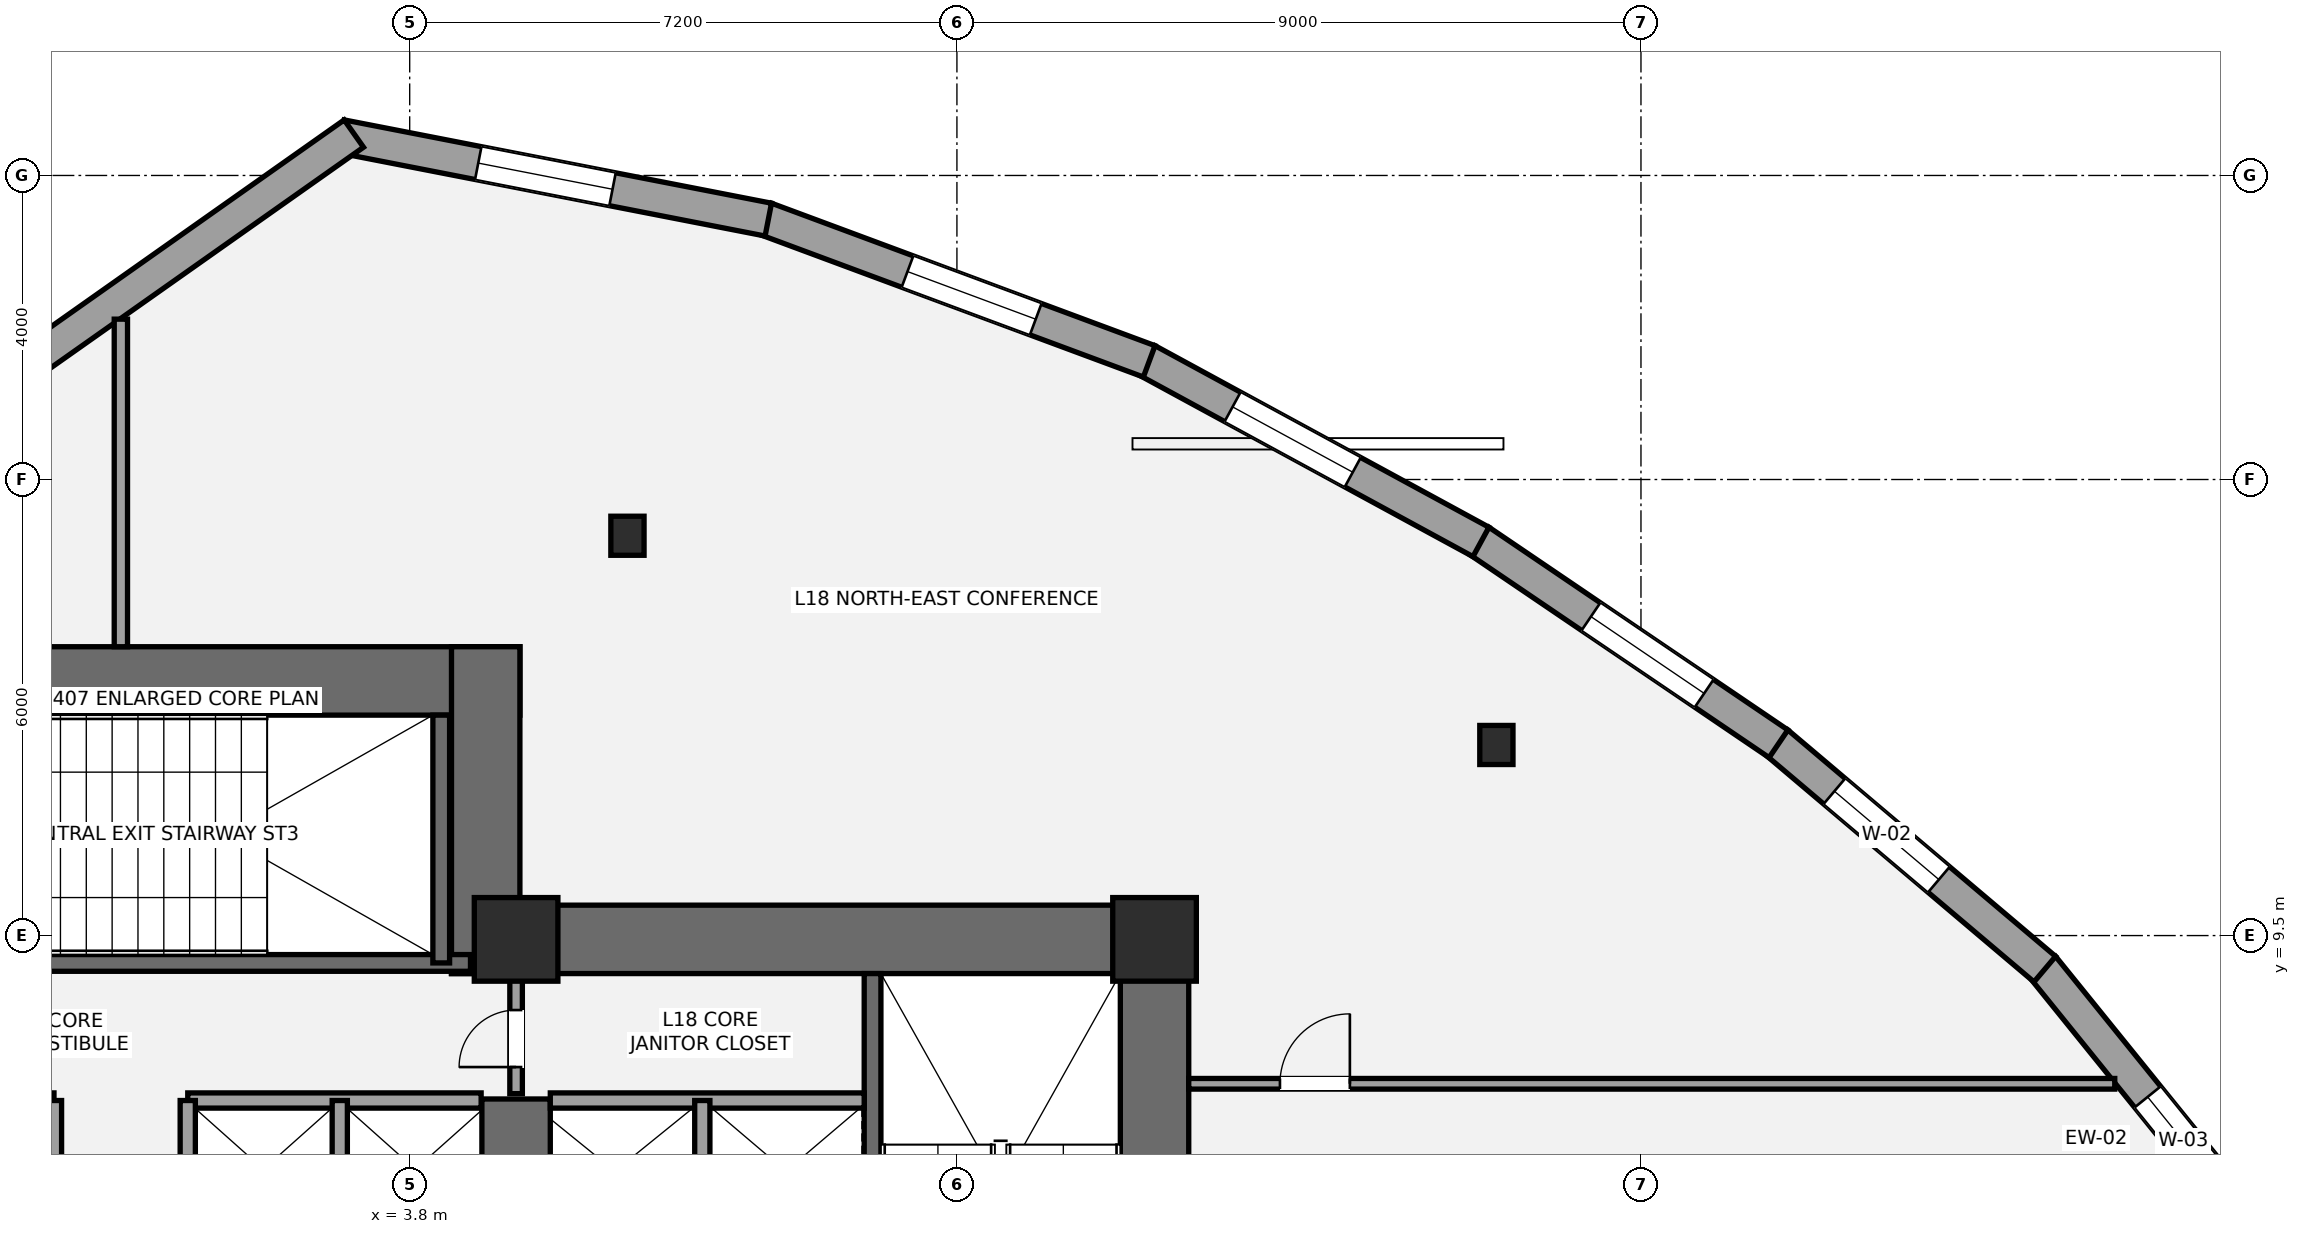
"""IFC4 building model, lengths in metres.
Left out: names, types, materials, properties, quantities, classifications, styles, units other than length and angle.
Written with IfcOpenShell. Run it as: python <this file> out.ifc"""

import sys

from ifc_helpers import new_model, si_unit, direction, frame, frame_2d, origin, origin_2d, place, context, subcontext, project, spatial, rectangle, i_section, extrude, element, fill, save


model = new_model("IFC4")
c1 = context("Model", 3, precision=1e-05, world=origin(), true_north=direction((0.0, 1.0)))
c2 = subcontext(c1, "Body", "Model", "MODEL_VIEW")
j1 = project(units=[si_unit("LENGTHUNIT", "METRE"), si_unit("PLANEANGLEUNIT", "RADIAN")], contexts=[c1])
p1 = place(None, origin())
s1 = spatial("IfcSite", under=j1, at=p1, CompositionType="ELEMENT")
p2 = place(p1, origin())
s2 = spatial("IfcBuilding", under=s1, at=p2, CompositionType="ELEMENT")
p3 = place(p2, frame((0.0, 0.0, 70.2)))
s3 = spatial("IfcBuildingStorey", under=s2, at=p3, CompositionType="ELEMENT", Elevation=70.2)
p4 = place(p3, frame((13.6, 0.95, 0.0), z_axis=(0.0, 0.0, 1.0), x_axis=(0.0, 1.0, 0.0)))
e1 = element("IfcWall", 1, at=p4, inside=s3, PredefinedType="SHEAR", context=c2, shape_type="SweptSolid", body=[
    extrude(rectangle(XDim=8.95, YDim=0.9, at=frame_2d((4.475, 0.0))), origin(), (0.0, 0.0, 1.0), 3.6),
])
p5 = place(p3, frame((4.35, 9.45, 0.0), z_axis=(0.0, 0.0, 1.0), x_axis=(1.0, 0.0, 0.0)))
e2 = element("IfcWall", 2, at=p5, inside=s3, PredefinedType="SHEAR", context=c2, shape_type="SweptSolid", body=[
    extrude(rectangle(XDim=9.7, YDim=0.9, at=frame_2d((4.85, 0.0))), origin(), (0.0, 0.0, 1.0), 3.6),
])
p6 = place(p3, frame((5.2, 5.35, 0.0), z_axis=(0.0, 0.0, 1.0), x_axis=(0.0, 1.0, 0.0)))
e3 = element("IfcWall", 3, at=p6, inside=s3, PredefinedType="SHEAR", context=c2, shape_type="SweptSolid", body=[
    extrude(rectangle(XDim=2.0, YDim=0.9, at=frame_2d((1.0, 0.0))), origin(), (0.0, 0.0, 1.0), 3.6),
])
p7 = place(p3, frame((9.89, 1.85, 0.0), z_axis=(0.0, 0.0, 1.0), x_axis=(0.0, 1.0, 0.0)))
e4 = element("IfcWall", 4, at=p7, inside=s3, PredefinedType="SHEAR", context=c2, shape_type="SweptSolid", body=[
    extrude(rectangle(XDim=7.15, YDim=0.22, at=frame_2d((3.575, 0.0))), origin(), (0.0, 0.0, 1.0), 3.6),
])
p8 = place(p3, frame((-5.25, 12.85, 0.0), z_axis=(0.0, 0.0, 1.0), x_axis=(1.0, 0.0, 0.0)))
e5 = element("IfcWall", 5, at=p8, inside=s3, PredefinedType="SHEAR", context=c2, shape_type="SweptSolid", body=[
    extrude(rectangle(XDim=10.5, YDim=0.9, at=frame_2d((5.25, 0.0))), origin(), (0.0, 0.0, 1.0), 3.6),
])
p9 = place(p3, frame((4.8, 9.0, 0.0), z_axis=(0.0, 0.0, 1.0), x_axis=(0.0, 1.0, 0.0)))
e6 = element("IfcWall", 6, at=p9, inside=s3, PredefinedType="SHEAR", context=c2, shape_type="SweptSolid", body=[
    extrude(rectangle(XDim=4.3, YDim=0.9, at=frame_2d((2.15, 0.0))), origin(), (0.0, 0.0, 1.0), 3.6),
])
p10 = place(p3, frame((-4.7, 9.14, 0.0), z_axis=(0.0, 0.0, 1.0), x_axis=(1.0, 0.0, 0.0)))
e7 = element("IfcWall", 7, at=p10, inside=s3, PredefinedType="SHEAR", context=c2, shape_type="SweptSolid", body=[
    extrude(rectangle(XDim=9.3, YDim=0.22, at=frame_2d((4.65, 0.0))), origin(), (0.0, 0.0, 1.0), 3.6),
])
p11 = place(p10, frame((1.15, 0.0, 0.0)))
e8 = element("IfcOpeningElement", 8, at=p11, cuts=e7, PredefinedType="OPENING", context=c2, shape_type="SweptSolid", body=[
    extrude(rectangle(XDim=1.05, YDim=2.15, at=frame_2d((0.525, 1.075))), frame((0.0, 0.12, 0.0), z_axis=(0.0, -1.0, 0.0), x_axis=(1.0, 0.0, 0.0)), (0.0, 0.0, 1.0), 0.24),
])
p12 = place(p3, frame((4.215, 9.14, 0.0), z_axis=(0.0, 0.0, 1.0), x_axis=(0.0, 1.0, 0.0)))
e9 = element("IfcWall", 9, at=p12, inside=s3, PredefinedType="SHEAR", context=c2, shape_type="SweptSolid", body=[
    extrude(rectangle(XDim=3.26, YDim=0.22, at=frame_2d((1.63, 0.0))), origin(), (0.0, 0.0, 1.0), 3.6),
])
for number, where, z_axis, x_axis in (
    (10, (5.2, 9.45, 0.0), (0.0, 0.0, 1.0), (1.0, 0.0, 0.0)),
    (11, (13.6, 9.45, 0.0), (0.0, 0.0, 1.0), (1.0, 0.0, 0.0)),
):
    element("IfcColumn", number, at=place(p3, frame(where, z_axis=z_axis, x_axis=x_axis)), inside=s3, PredefinedType="COLUMN", context=c2, shape_type="SweptSolid", body=[
        extrude(rectangle(XDim=1.1, YDim=1.1, at=origin_2d()), origin(), (0.0, 0.0, 1.0), 3.6),
    ])
for number, where, z_axis, x_axis in (
    (12, (18.098, 12.007, 0.0), (0.0, 0.0, 1.0), (1.0, 0.0, 0.0)),
    (13, (6.665, 14.76, 0.0), (0.0, 0.0, 1.0), (1.0, 0.0, 0.0)),
):
    element("IfcColumn", number, at=place(p3, frame(where, z_axis=z_axis, x_axis=x_axis)), inside=s3, PredefinedType="COLUMN", context=c2, shape_type="SweptSolid", body=[
        extrude(i_section(OverallWidth=0.437, OverallDepth=0.514, WebThickness=0.061, FlangeThickness=0.097, at=origin_2d()), origin(), (0.0, 0.0, 1.0), 3.6),
    ])
p13 = place(p3, frame((25.284, 9.088, 0.0), z_axis=(0.0, 0.0, 1.0), x_axis=(0.628444327975, -0.777854566507, 0.0)))
e14 = element("IfcWall", 14, at=p13, inside=s3, PredefinedType="STANDARD", context=c2, shape_type="SweptSolid", body=[
    extrude(rectangle(XDim=4.399, YDim=0.44, at=frame_2d((2.199, 0.0))), origin(), (0.0, 0.0, 1.0), 2.529),
])
p14 = place(p13, frame((2.199, 0.0, 0.65)))
e15 = element("IfcOpeningElement", 15, at=p14, cuts=e14, PredefinedType="OPENING", context=c2, shape_type="SweptSolid", body=[
    extrude(rectangle(XDim=1.5, YDim=1.7, at=frame_2d((0.75, 0.85))), frame((0.0, 0.23, 0.0), z_axis=(0.0, -1.0, 0.0), x_axis=(1.0, 0.0, 0.0)), (0.0, 0.0, 1.0), 0.46),
])
p15 = place(p3, frame((21.791, 12.037, 0.0), z_axis=(0.0, 0.0, 1.0), x_axis=(0.763546839071, -0.645752448346, 0.0)))
e16 = element("IfcWall", 16, at=p15, inside=s3, PredefinedType="STANDARD", context=c2, shape_type="SweptSolid", body=[
    extrude(rectangle(XDim=4.614, YDim=0.44, at=frame_2d((2.307, 0.0))), origin(), (0.0, 0.0, 1.0), 2.529),
])
p16 = place(p15, frame((0.988, 0.0, 0.65)))
e17 = element("IfcOpeningElement", 17, at=p16, cuts=e16, PredefinedType="OPENING", context=c2, shape_type="SweptSolid", body=[
    extrude(rectangle(XDim=1.8, YDim=1.7, at=frame_2d((0.9, 0.85))), frame((0.0, 0.23, 0.0), z_axis=(0.0, -1.0, 0.0), x_axis=(1.0, 0.0, 0.0)), (0.0, 0.0, 1.0), 0.46),
])
p17 = place(p3, frame((17.876, 14.69, 0.0), z_axis=(0.0, 0.0, 1.0), x_axis=(0.827645395623, -0.561251368911, 0.0)))
e18 = element("IfcWall", 18, at=p17, inside=s3, PredefinedType="STANDARD", context=c2, shape_type="SweptSolid", body=[
    extrude(rectangle(XDim=4.752, YDim=0.44, at=frame_2d((2.376, 0.0))), origin(), (0.0, 0.0, 1.0), 2.529),
])
p18 = place(p17, frame((1.771, 0.0, 0.65)))
e19 = element("IfcOpeningElement", 19, at=p18, cuts=e18, PredefinedType="OPENING", context=c2, shape_type="SweptSolid", body=[
    extrude(rectangle(XDim=1.8, YDim=1.7, at=frame_2d((0.9, 0.85))), frame((0.0, 0.23, 0.0), z_axis=(0.0, -1.0, 0.0), x_axis=(1.0, 0.0, 0.0)), (0.0, 0.0, 1.0), 0.46),
])
p19 = place(p3, frame((13.501, 17.067, 0.0), z_axis=(0.0, 0.0, 1.0), x_axis=(0.878571961318, -0.477609996531, 0.0)))
e20 = element("IfcWall", 20, at=p19, inside=s3, PredefinedType="STANDARD", context=c2, shape_type="SweptSolid", body=[
    extrude(rectangle(XDim=5.001, YDim=0.44, at=frame_2d((2.5, 0.0))), origin(), (0.0, 0.0, 1.0), 2.529),
])
p20 = place(p19, frame((1.281, 0.0, 0.65)))
e21 = element("IfcOpeningElement", 21, at=p20, cuts=e20, PredefinedType="OPENING", context=c2, shape_type="SweptSolid", body=[
    extrude(rectangle(XDim=1.8, YDim=1.7, at=frame_2d((0.9, 0.85))), frame((0.0, 0.23, 0.0), z_axis=(0.0, -1.0, 0.0), x_axis=(1.0, 0.0, 0.0)), (0.0, 0.0, 1.0), 0.46),
])
p21 = place(p3, frame((8.484, 18.929, 0.0), z_axis=(0.0, 0.0, 1.0), x_axis=(0.93742061918, -0.348199056195, 0.0)))
e22 = element("IfcWall", 22, at=p21, inside=s3, PredefinedType="STANDARD", context=c2, shape_type="SweptSolid", body=[
    extrude(rectangle(XDim=5.383, YDim=0.44, at=frame_2d((2.691, 0.0))), origin(), (0.0, 0.0, 1.0), 2.529),
])
p22 = place(p21, frame((1.99, 0.0, 0.65)))
e23 = element("IfcOpeningElement", 23, at=p22, cuts=e22, PredefinedType="OPENING", context=c2, shape_type="SweptSolid", body=[
    extrude(rectangle(XDim=1.8, YDim=1.7, at=frame_2d((0.9, 0.85))), frame((0.0, 0.23, 0.0), z_axis=(0.0, -1.0, 0.0), x_axis=(1.0, 0.0, 0.0)), (0.0, 0.0, 1.0), 0.46),
])
p23 = place(p3, frame((2.896, 20.015, 0.0), z_axis=(0.0, 0.0, 1.0), x_axis=(0.981531216559, -0.191302041079, 0.0)))
e24 = element("IfcWall", 24, at=p23, inside=s3, PredefinedType="STANDARD", context=c2, shape_type="SweptSolid", body=[
    extrude(rectangle(XDim=5.728, YDim=0.44, at=frame_2d((2.864, 0.0))), origin(), (0.0, 0.0, 1.0), 2.529),
])
p24 = place(p23, frame((1.84, 0.0, 0.65)))
e25 = element("IfcOpeningElement", 25, at=p24, cuts=e24, PredefinedType="OPENING", context=c2, shape_type="SweptSolid", body=[
    extrude(rectangle(XDim=1.8, YDim=1.7, at=frame_2d((0.9, 0.85))), frame((0.0, 0.23, 0.0), z_axis=(0.0, -1.0, 0.0), x_axis=(1.0, 0.0, 0.0)), (0.0, 0.0, 1.0), 0.46),
])
p25 = place(p3, frame((-2.266, 16.291, 0.0), z_axis=(0.0, 0.0, 1.0), x_axis=(0.817155536966, 0.576417234653, 0.0)))
e26 = element("IfcWall", 26, at=p25, inside=s3, PredefinedType="STANDARD", context=c2, shape_type="SweptSolid", body=[
    extrude(rectangle(XDim=6.524, YDim=0.44, at=frame_2d((3.262, 0.0))), origin(), (0.0, 0.0, 1.0), 2.533),
])
p26 = place(p3, frame((5.65, 7.33, 0.0), z_axis=(0.0, 0.0, 1.0), x_axis=(1.0, 0.0, 0.0)))
e27 = element("IfcWall", 27, at=p26, inside=s3, PredefinedType="SOLIDWALL", context=c2, shape_type="SweptSolid", body=[
    extrude(rectangle(XDim=4.13, YDim=0.2, at=frame_2d((2.065, 0.0))), origin(), (0.0, 0.0, 1.0), 3.4),
])
p27 = place(p3, frame((7.65, 5.47, 0.0), z_axis=(0.0, 0.0, 1.0), x_axis=(0.0, 1.0, 0.0)))
e28 = element("IfcWall", 28, at=p27, inside=s3, PredefinedType="SOLIDWALL", context=c2, shape_type="SweptSolid", body=[
    extrude(rectangle(XDim=1.86, YDim=0.2, at=frame_2d((0.93, 0.0))), origin(), (0.0, 0.0, 1.0), 3.4),
])
for number, where, z_axis, x_axis in (
    (29, (-4.74, 7.33, 0.0), (0.0, 0.0, 1.0), (1.0, 0.0, 0.0)),
    (30, (0.88, 7.33, 0.0), (0.0, 0.0, 1.0), (1.0, 0.0, 0.0)),
):
    element("IfcWall", number, at=place(p3, frame(where, z_axis=z_axis, x_axis=x_axis)), inside=s3, PredefinedType="SOLIDWALL", context=c2, shape_type="SweptSolid", body=[
        extrude(rectangle(XDim=3.86, YDim=0.2, at=frame_2d((1.93, 0.0))), origin(), (0.0, 0.0, 1.0), 3.4),
    ])
for number, where, z_axis, x_axis in (
    (31, (2.88, 5.52, 0.0), (0.0, 0.0, 1.0), (0.0, 1.0, 0.0)),
    (32, (-0.88, 5.52, 0.0), (0.0, 0.0, 1.0), (0.0, 1.0, 0.0)),
    (33, (0.88, 5.52, 0.0), (0.0, 0.0, 1.0), (0.0, 1.0, 0.0)),
):
    element("IfcWall", number, at=place(p3, frame(where, z_axis=z_axis, x_axis=x_axis)), inside=s3, PredefinedType="SOLIDWALL", context=c2, shape_type="SweptSolid", body=[
        extrude(rectangle(XDim=1.81, YDim=0.2, at=frame_2d((0.905, 0.0))), origin(), (0.0, 0.0, 1.0), 3.4),
    ])
p28 = place(p3, frame((5.2, 7.42, 0.0), z_axis=(0.0, 0.0, 1.0), x_axis=(0.0, 1.0, 0.0)))
e34 = element("IfcWall", 34, at=p28, inside=s3, PredefinedType="PARTITIONING", context=c2, shape_type="SweptSolid", body=[
    extrude(rectangle(XDim=1.58, YDim=0.165, at=frame_2d((0.79, 0.0))), origin(), (0.0, 0.0, 1.0), 3.4),
])
p29 = place(p28, frame((0.35, 0.0, 0.0)))
e35 = element("IfcOpeningElement", 35, at=p29, cuts=e34, PredefinedType="OPENING", context=c2, shape_type="SweptSolid", body=[
    extrude(rectangle(XDim=0.75, YDim=2.1, at=frame_2d((0.375, 1.05))), frame((0.0, 0.093, 0.0), z_axis=(0.0, -1.0, 0.0), x_axis=(1.0, 0.0, 0.0)), (0.0, 0.0, 1.0), 0.185),
])
p30 = place(p3, frame((14.05, 7.55, 0.0), z_axis=(0.0, 0.0, 1.0), x_axis=(1.0, 0.0, 0.0)))
e36 = element("IfcWall", 36, at=p30, inside=s3, PredefinedType="PARTITIONING", context=c2, shape_type="SweptSolid", body=[
    extrude(rectangle(XDim=12.184, YDim=0.14, at=frame_2d((6.092, 0.0))), origin(), (0.0, 0.0, 1.0), 2.853),
])
p31 = place(p30, frame((1.2, 0.0, 0.0)))
e37 = element("IfcOpeningElement", 37, at=p31, cuts=e36, PredefinedType="OPENING", context=c2, shape_type="SweptSolid", body=[
    extrude(rectangle(XDim=0.92, YDim=2.15, at=frame_2d((0.46, 1.075))), frame((0.0, 0.08, 0.0), z_axis=(0.0, -1.0, 0.0), x_axis=(1.0, 0.0, 0.0)), (0.0, 0.0, 1.0), 0.16),
])
p32 = place(p3, frame((0.0, 13.3, 0.0), z_axis=(0.0, 0.0, 1.0), x_axis=(0.0, 1.0, 0.0)))
e38 = element("IfcWall", 38, at=p32, inside=s3, PredefinedType="PARTITIONING", context=c2, shape_type="SweptSolid", body=[
    extrude(rectangle(XDim=4.31, YDim=0.175, at=frame_2d((2.155, 0.0))), origin(), (0.0, 0.0, 1.0), 3.4),
])
p33 = place(p14, origin())
e39 = element("IfcWindow", 39, at=p33, inside=s3, PartitioningType="SINGLE_PANEL", PredefinedType="WINDOW", context=c2, shape_type="SweptSolid", body=[
    extrude(rectangle(XDim=1.5, YDim=1.7, at=frame_2d((0.75, 0.85))), frame((0.0, -0.01, 0.0), z_axis=(0.0, -1.0, 0.0), x_axis=(1.0, 0.0, 0.0)), (0.0, 0.0, 1.0), 0.06),
])
fill(e15, e39)
p34 = place(p16, origin())
e40 = element("IfcWindow", 40, at=p34, inside=s3, PartitioningType="SINGLE_PANEL", PredefinedType="WINDOW", context=c2, shape_type="SweptSolid", body=[
    extrude(rectangle(XDim=1.8, YDim=1.7, at=frame_2d((0.9, 0.85))), frame((0.0, -0.01, 0.0), z_axis=(0.0, -1.0, 0.0), x_axis=(1.0, 0.0, 0.0)), (0.0, 0.0, 1.0), 0.06),
])
fill(e17, e40)
p35 = place(p18, origin())
e41 = element("IfcWindow", 41, at=p35, inside=s3, PartitioningType="SINGLE_PANEL", PredefinedType="WINDOW", context=c2, shape_type="SweptSolid", body=[
    extrude(rectangle(XDim=1.8, YDim=1.7, at=frame_2d((0.9, 0.85))), frame((0.0, -0.01, 0.0), z_axis=(0.0, -1.0, 0.0), x_axis=(1.0, 0.0, 0.0)), (0.0, 0.0, 1.0), 0.06),
])
fill(e19, e41)
p36 = place(p20, origin())
e42 = element("IfcWindow", 42, at=p36, inside=s3, PartitioningType="SINGLE_PANEL", PredefinedType="WINDOW", context=c2, shape_type="SweptSolid", body=[
    extrude(rectangle(XDim=1.8, YDim=1.7, at=frame_2d((0.9, 0.85))), frame((0.0, -0.01, 0.0), z_axis=(0.0, -1.0, 0.0), x_axis=(1.0, 0.0, 0.0)), (0.0, 0.0, 1.0), 0.06),
])
fill(e21, e42)
p37 = place(p22, origin())
e43 = element("IfcWindow", 43, at=p37, inside=s3, PartitioningType="SINGLE_PANEL", PredefinedType="WINDOW", context=c2, shape_type="SweptSolid", body=[
    extrude(rectangle(XDim=1.8, YDim=1.7, at=frame_2d((0.9, 0.85))), frame((0.0, -0.01, 0.0), z_axis=(0.0, -1.0, 0.0), x_axis=(1.0, 0.0, 0.0)), (0.0, 0.0, 1.0), 0.06),
])
fill(e23, e43)
p38 = place(p24, origin())
e44 = element("IfcWindow", 44, at=p38, inside=s3, PartitioningType="SINGLE_PANEL", PredefinedType="WINDOW", context=c2, shape_type="SweptSolid", body=[
    extrude(rectangle(XDim=1.8, YDim=1.7, at=frame_2d((0.9, 0.85))), frame((0.0, -0.01, 0.0), z_axis=(0.0, -1.0, 0.0), x_axis=(1.0, 0.0, 0.0)), (0.0, 0.0, 1.0), 0.06),
])
fill(e25, e44)
p39 = place(p29, origin())
e45 = element("IfcDoor", 45, at=p39, inside=s3, OperationType="SINGLE_SWING_LEFT", PredefinedType="DOOR", context=c2, shape_type="SweptSolid", body=[
    extrude(rectangle(XDim=0.75, YDim=2.1, at=frame_2d((0.375, 1.05))), frame((0.0, 0.025, 0.0), z_axis=(0.0, -1.0, 0.0), x_axis=(1.0, 0.0, 0.0)), (0.0, 0.0, 1.0), 0.05),
])
fill(e35, e45)
p40 = place(p31, origin())
e46 = element("IfcDoor", 46, at=p40, inside=s3, OperationType="SINGLE_SWING_RIGHT", PredefinedType="DOOR", context=c2, shape_type="SweptSolid", body=[
    extrude(rectangle(XDim=0.92, YDim=2.15, at=frame_2d((0.46, 1.075))), frame((0.0, 0.025, 0.0), z_axis=(0.0, -1.0, 0.0), x_axis=(1.0, 0.0, 0.0)), (0.0, 0.0, 1.0), 0.05),
])
fill(e37, e46)
save(model, sys.argv[1])
